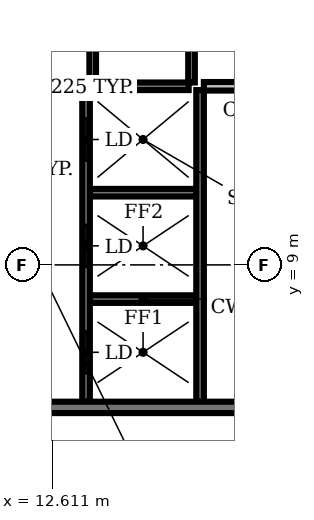
"""IFC4 building model, lengths in metres.
Left out: names, types, materials, properties, quantities, classifications, styles, units other than length and angle.
Written with IfcOpenShell. Run it as: python <this file> out.ifc"""

import sys

from ifc_helpers import new_model, si_unit, direction, frame, frame_2d, origin, place, context, subcontext, project, spatial, rectangle, extrude, element, fill, save


model = new_model("IFC4")
c1 = context("Model", 3, precision=1e-05, world=origin(), true_north=direction((0.0, 1.0)))
c2 = subcontext(c1, "Body", "Model", "MODEL_VIEW")
j1 = project(units=[si_unit("LENGTHUNIT", "METRE"), si_unit("PLANEANGLEUNIT", "RADIAN")], contexts=[c1])
p1 = place(None, origin())
s1 = spatial("IfcSite", under=j1, at=p1, CompositionType="ELEMENT")
p2 = place(p1, origin())
s2 = spatial("IfcBuilding", under=s1, at=p2, CompositionType="ELEMENT")
p3 = place(p2, frame((0.0, 0.0, 281.0)))
s3 = spatial("IfcBuildingStorey", under=s2, at=p3, CompositionType="ELEMENT", Elevation=281.0)
for number, where, z_axis, x_axis in (
    (1, (13.6, 8.1, 0.0), (0.0, 0.0, 1.0), (1.0, 0.0, 0.0)),
    (2, (13.6, 10.9, 0.0), (0.0, 0.0, 1.0), (1.0, 0.0, 0.0)),
):
    element("IfcWall", number, at=place(p3, frame(where, z_axis=z_axis, x_axis=x_axis)), inside=s3, PredefinedType="SHEAR", context=c2, shape_type="SweptSolid", body=[
        extrude(rectangle(XDim=2.8, YDim=0.2, at=frame_2d((1.4, 0.0))), origin(), (0.0, 0.0, 1.0), 3.85),
    ])
p4 = place(p3, frame((9.4, 13.7, 0.0), z_axis=(0.0, 0.0, 1.0), x_axis=(1.0, 0.0, 0.0)))
e3 = element("IfcWall", 3, at=p4, inside=s3, PredefinedType="PARTITIONING", context=c2, shape_type="SweptSolid", body=[
    extrude(rectangle(XDim=4.0, YDim=0.225, at=frame_2d((2.0, 0.0))), origin(), (0.0, 0.0, 1.0), 3.85),
])
p5 = place(p3, frame((13.75, 13.7, 0.0), z_axis=(0.0, 0.0, 1.0), x_axis=(1.0, 0.0, 0.0)))
e4 = element("IfcWall", 4, at=p5, inside=s3, PredefinedType="SHEAR", context=c2, shape_type="SweptSolid", body=[
    extrude(rectangle(XDim=2.45, YDim=0.2, at=frame_2d((1.225, 0.0))), origin(), (0.0, 0.0, 1.0), 3.85),
])
p6 = place(p3, frame((16.6, 13.7, 0.0), z_axis=(0.0, 0.0, 1.0), x_axis=(1.0, 0.0, 0.0)))
e5 = element("IfcWall", 5, at=p6, inside=s3, PredefinedType="PARTITIONING", context=c2, shape_type="SweptSolid", body=[
    extrude(rectangle(XDim=7.4, YDim=0.225, at=frame_2d((3.7, 0.0))), origin(), (0.0, 0.0, 1.0), 3.85),
])
p7 = place(p3, frame((13.5, 5.4, 0.0), z_axis=(0.0, 0.0, 1.0), x_axis=(0.0, 1.0, 0.0)))
e6 = element("IfcWall", 6, at=p7, inside=s3, PredefinedType="SHEAR", context=c2, shape_type="SweptSolid", body=[
    extrude(rectangle(XDim=8.2, YDim=0.2, at=frame_2d((4.1, 0.0))), origin(), (0.0, 0.0, 1.0), 3.85),
])
p8 = place(p7, frame((0.75, 0.0, 0.0)))
e7 = element("IfcOpeningElement", 7, at=p8, cuts=e6, PredefinedType="OPENING", context=c2, shape_type="SweptSolid", body=[
    extrude(rectangle(XDim=1.1, YDim=2.1, at=frame_2d((0.55, 1.05))), frame((0.0, 0.11, 0.0), z_axis=(0.0, -1.0, 0.0), x_axis=(1.0, 0.0, 0.0)), (0.0, 0.0, 1.0), 0.22),
])
p9 = place(p7, frame((3.55, 0.0, 0.0)))
e8 = element("IfcOpeningElement", 8, at=p9, cuts=e6, PredefinedType="OPENING", context=c2, shape_type="SweptSolid", body=[
    extrude(rectangle(XDim=1.1, YDim=2.1, at=frame_2d((0.55, 1.05))), frame((0.0, 0.11, 0.0), z_axis=(0.0, -1.0, 0.0), x_axis=(1.0, 0.0, 0.0)), (0.0, 0.0, 1.0), 0.22),
])
p10 = place(p7, frame((6.35, 0.0, 0.0)))
e9 = element("IfcOpeningElement", 9, at=p10, cuts=e6, PredefinedType="OPENING", context=c2, shape_type="SweptSolid", body=[
    extrude(rectangle(XDim=1.1, YDim=2.1, at=frame_2d((0.55, 1.05))), frame((0.0, 0.11, 0.0), z_axis=(0.0, -1.0, 0.0), x_axis=(1.0, 0.0, 0.0)), (0.0, 0.0, 1.0), 0.22),
])
for number, where, z_axis, x_axis in (
    (10, (13.675, 13.8, 0.0), (0.0, 0.0, 1.0), (0.0, 1.0, 0.0)),
    (11, (16.275, 13.8, 0.0), (0.0, 0.0, 1.0), (0.0, 1.0, 0.0)),
):
    element("IfcWall", number, at=place(p3, frame(where, z_axis=z_axis, x_axis=x_axis)), inside=s3, PredefinedType="PARTITIONING", context=c2, shape_type="SweptSolid", body=[
        extrude(rectangle(XDim=2.6, YDim=0.175, at=frame_2d((1.3, 0.0))), origin(), (0.0, 0.0, 1.0), 3.85),
    ])
p11 = place(p3, frame((16.5, 5.4, 0.0), z_axis=(0.0, 0.0, 1.0), x_axis=(0.0, 1.0, 0.0)))
e12 = element("IfcWall", 12, at=p11, inside=s3, PredefinedType="SHEAR", context=c2, shape_type="SweptSolid", body=[
    extrude(rectangle(XDim=8.2, YDim=0.2, at=frame_2d((4.1, 0.0))), origin(), (0.0, 0.0, 1.0), 3.85),
])
p12 = place(p3, frame((24.0, 5.25, 0.0), z_axis=(0.0, 0.0, 1.0), x_axis=(-1.0, 0.0, 0.0)))
e13 = element("IfcWall", 13, at=p12, inside=s3, PredefinedType="SHEAR", context=c2, shape_type="SweptSolid", body=[
    extrude(rectangle(XDim=18.0, YDim=0.3, at=frame_2d((9.0, 0.0))), origin(), (0.0, 0.0, 1.0), 3.85),
])
p13 = place(p12, frame((13.0, 0.0, 0.0)))
e14 = element("IfcOpeningElement", 14, at=p13, cuts=e13, PredefinedType="OPENING", context=c2, shape_type="SweptSolid", body=[
    extrude(rectangle(XDim=1.2, YDim=2.1, at=frame_2d((0.6, 1.05))), frame((0.0, 0.16, 0.0), z_axis=(0.0, -1.0, 0.0), x_axis=(1.0, 0.0, 0.0)), (0.0, 0.0, 1.0), 0.32),
])
p14 = place(p12, frame((4.9, 0.0, 0.0)))
e15 = element("IfcOpeningElement", 15, at=p14, cuts=e13, PredefinedType="OPENING", context=c2, shape_type="SweptSolid", body=[
    extrude(rectangle(XDim=1.0, YDim=2.1, at=frame_2d((0.5, 1.05))), frame((0.0, 0.16, 0.0), z_axis=(0.0, -1.0, 0.0), x_axis=(1.0, 0.0, 0.0)), (0.0, 0.0, 1.0), 0.32),
])
p15 = place(p8, origin())
e16 = element("IfcDoor", 16, at=p15, inside=s3, OperationType="DOUBLE_DOOR_SLIDING", PredefinedType="DOOR", context=c2, shape_type="SweptSolid", body=[
    extrude(rectangle(XDim=1.1, YDim=2.1, at=frame_2d((0.55, 1.05))), frame((0.0, 0.025, 0.0), z_axis=(0.0, -1.0, 0.0), x_axis=(1.0, 0.0, 0.0)), (0.0, 0.0, 1.0), 0.05),
])
fill(e7, e16)
p16 = place(p9, origin())
e17 = element("IfcDoor", 17, at=p16, inside=s3, OperationType="DOUBLE_DOOR_SLIDING", PredefinedType="DOOR", context=c2, shape_type="SweptSolid", body=[
    extrude(rectangle(XDim=1.1, YDim=2.1, at=frame_2d((0.55, 1.05))), frame((0.0, 0.025, 0.0), z_axis=(0.0, -1.0, 0.0), x_axis=(1.0, 0.0, 0.0)), (0.0, 0.0, 1.0), 0.05),
])
fill(e8, e17)
p17 = place(p10, origin())
e18 = element("IfcDoor", 18, at=p17, inside=s3, OperationType="DOUBLE_DOOR_SLIDING", PredefinedType="DOOR", context=c2, shape_type="SweptSolid", body=[
    extrude(rectangle(XDim=1.1, YDim=2.1, at=frame_2d((0.55, 1.05))), frame((0.0, 0.025, 0.0), z_axis=(0.0, -1.0, 0.0), x_axis=(1.0, 0.0, 0.0)), (0.0, 0.0, 1.0), 0.05),
])
fill(e9, e18)
save(model, sys.argv[1])
